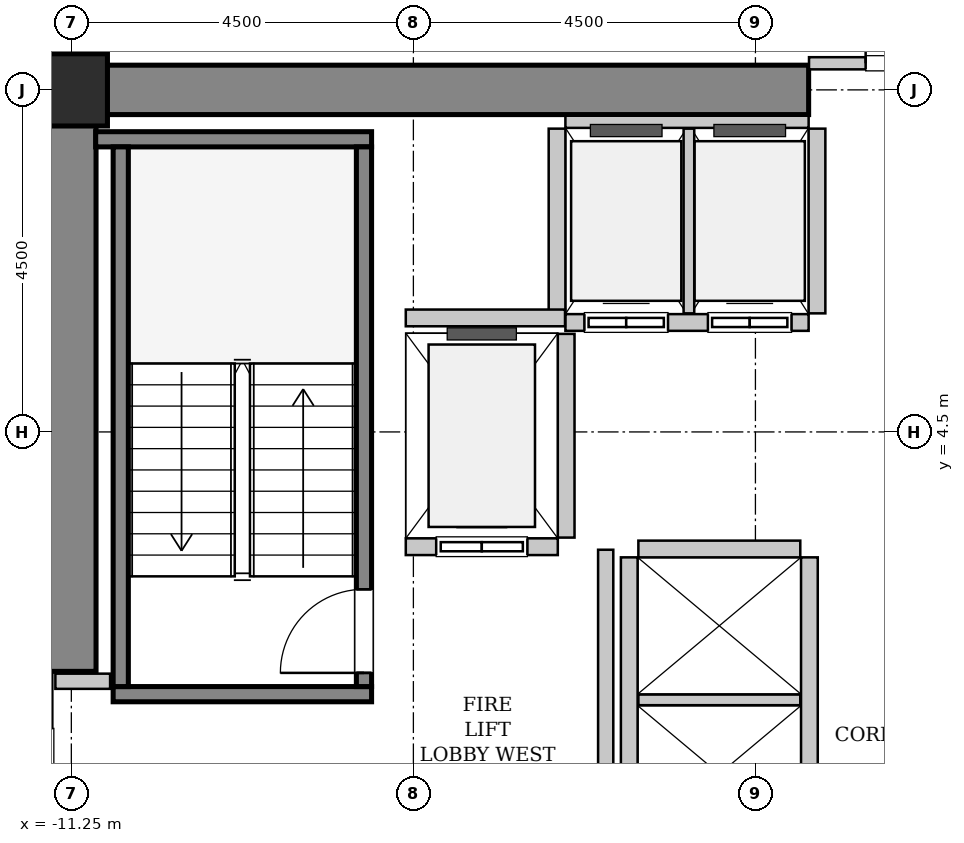
"""IFC4 building model, lengths in metres.
Left out: names, types, materials, properties, quantities, classifications, styles, units other than length and angle.
Written with IfcOpenShell. Run it as: python <this file> out.ifc"""

import sys

from ifc_helpers import new_model, si_unit, direction, frame, frame_2d, origin, origin_2d, place, context, subcontext, project, spatial, rectangle, hollow_rectangle, extrude, source, transform, mapped, element, fill, save


model = new_model("IFC4")
c1 = context("Model", 3, precision=1e-05, world=origin(), true_north=direction((0.0, 1.0)))
c2 = subcontext(c1, "Body", "Model", "MODEL_VIEW")
j1 = project(units=[si_unit("LENGTHUNIT", "METRE"), si_unit("PLANEANGLEUNIT", "RADIAN")], contexts=[c1])
p1 = place(None, origin())
s1 = spatial("IfcSite", under=j1, at=p1, CompositionType="ELEMENT")
p2 = place(p1, origin())
s2 = spatial("IfcBuilding", under=s1, at=p2, CompositionType="ELEMENT")
p3 = place(p2, frame((0.0, 0.0, 44.4)))
s3 = spatial("IfcBuildingStorey", under=s2, at=p3, CompositionType="ELEMENT", Elevation=44.4)
m1 = source(origin(), c2, "Body", "SweptSolid", [
    extrude(rectangle(XDim=10.025, YDim=0.65, at=frame_2d((5.012, 0.0))), origin(), (0.0, 0.0, 1.0), 3.8),
])
p4 = place(p3, frame((-11.575, 9.0, 0.0), z_axis=(0.0, 0.0, 1.0), x_axis=(1.0, 0.0, 0.0)))
e1 = element("IfcWall", 1, at=p4, inside=s3, PredefinedType="SHEAR", context=c2, shape_type="MappedRepresentation", body=[
    mapped(m1, transform((0.0, 0.0, 0.0), x_axis=(1.0, 0.0, 0.0), y_axis=(0.0, 1.0, 0.0), z_axis=(0.0, 0.0, 1.0), scale=1.0)),
])
m2 = source(origin(), c2, "Body", "SweptSolid", [
    extrude(rectangle(XDim=7.325, YDim=0.65, at=frame_2d((3.663, 0.0))), origin(), (0.0, 0.0, 1.0), 3.8),
])
p5 = place(p3, frame((-11.25, 1.35, 0.0), z_axis=(0.0, 0.0, 1.0), x_axis=(0.0, 1.0, 0.0)))
e2 = element("IfcWall", 2, at=p5, inside=s3, PredefinedType="SHEAR", context=c2, shape_type="MappedRepresentation", body=[
    mapped(m2, transform((0.0, 0.0, 0.0), x_axis=(1.0, 0.0, 0.0), y_axis=(0.0, 1.0, 0.0), z_axis=(0.0, 0.0, 1.0), scale=1.0)),
])
m3 = source(origin(), c2, "Body", "SweptSolid", [
    extrude(hollow_rectangle(XDim=0.95, YDim=0.95, WallThickness=0.045, InnerFilletRadius=0.045, OuterFilletRadius=0.09, at=origin_2d()), origin(), (0.0, 0.0, 1.0), 3.8),
])
p6 = place(p3, frame((-11.25, 9.0, 0.0), z_axis=(0.0, 0.0, 1.0), x_axis=(1.0, 0.0, 0.0)))
e3 = element("IfcColumn", 3, at=p6, inside=s3, PredefinedType="COLUMN", context=c2, shape_type="MappedRepresentation", body=[
    mapped(m3, transform((0.0, 0.0, 0.0), x_axis=(1.0, 0.0, 0.0), y_axis=(0.0, 1.0, 0.0), z_axis=(0.0, 0.0, 1.0), scale=1.0)),
])
m4 = source(origin(), c2, "Body", "SweptSolid", [
    extrude(rectangle(XDim=3.4, YDim=0.2, at=frame_2d((1.7, 0.0))), origin(), (0.0, 0.0, 1.0), 3.8),
])
p7 = place(p3, frame((-7.3, 1.05, 0.0), z_axis=(0.0, 0.0, 1.0), x_axis=(-1.0, 0.0, 0.0)))
e4 = element("IfcWall", 4, at=p7, inside=s3, PredefinedType="SOLIDWALL", context=c2, shape_type="MappedRepresentation", body=[
    mapped(m4, transform((0.0, 0.0, 0.0), x_axis=(1.0, 0.0, 0.0), y_axis=(0.0, 1.0, 0.0), z_axis=(0.0, 0.0, 1.0), scale=1.0)),
])
m5 = source(origin(), c2, "Body", "SweptSolid", [
    extrude(rectangle(XDim=3.63, YDim=0.2, at=frame_2d((1.815, 0.0))), origin(), (0.0, 0.0, 1.0), 3.8),
])
p8 = place(p3, frame((-7.3, 8.35, 0.0), z_axis=(0.0, 0.0, 1.0), x_axis=(-1.0, 0.0, 0.0)))
e5 = element("IfcWall", 5, at=p8, inside=s3, PredefinedType="SOLIDWALL", context=c2, shape_type="MappedRepresentation", body=[
    mapped(m5, transform((0.0, 0.0, 0.0), x_axis=(1.0, 0.0, 0.0), y_axis=(0.0, 1.0, 0.0), z_axis=(0.0, 0.0, 1.0), scale=1.0)),
])
m6 = source(origin(), c2, "Body", "SweptSolid", [
    extrude(rectangle(XDim=7.1, YDim=0.2, at=frame_2d((3.55, 0.0))), origin(), (0.0, 0.0, 1.0), 3.8),
])
p9 = place(p3, frame((-7.4, 1.15, 0.0), z_axis=(0.0, 0.0, 1.0), x_axis=(0.0, 1.0, 0.0)))
e6 = element("IfcWall", 6, at=p9, inside=s3, PredefinedType="SOLIDWALL", context=c2, shape_type="MappedRepresentation", body=[
    mapped(m6, transform((0.0, 0.0, 0.0), x_axis=(1.0, 0.0, 0.0), y_axis=(0.0, 1.0, 0.0), z_axis=(0.0, 0.0, 1.0), scale=1.0)),
])
p10 = place(p9, frame((0.18, 0.0, 0.0)))
e7 = element("IfcOpeningElement", 7, at=p10, cuts=e6, PredefinedType="OPENING", context=c2, shape_type="SweptSolid", body=[
    extrude(rectangle(XDim=1.1, YDim=2.15, at=frame_2d((0.55, 1.075))), frame((0.0, 0.11, 0.0), z_axis=(0.0, -1.0, 0.0), x_axis=(1.0, 0.0, 0.0)), (0.0, 0.0, 1.0), 0.22),
])
p11 = place(p3, frame((-10.6, 1.15, 0.0), z_axis=(0.0, 0.0, 1.0), x_axis=(0.0, 1.0, 0.0)))
e8 = element("IfcWall", 8, at=p11, inside=s3, PredefinedType="SOLIDWALL", context=c2, shape_type="MappedRepresentation", body=[
    mapped(m6, transform((0.0, 0.0, 0.0), x_axis=(1.0, 0.0, 0.0), y_axis=(0.0, 1.0, 0.0), z_axis=(0.0, 0.0, 1.0), scale=1.0)),
])
m7 = source(origin(), c2, "Body", "SweptSolid", [
    extrude(rectangle(XDim=2.0, YDim=0.22, at=frame_2d((1.0, 0.0))), origin(), (0.0, 0.0, 1.0), 3.535),
])
p12 = place(p3, frame((-6.85, 2.99, 0.0), z_axis=(0.0, 0.0, 1.0), x_axis=(1.0, 0.0, 0.0)))
e9 = element("IfcWall", 9, at=p12, inside=s3, PredefinedType="SOLIDWALL", context=c2, shape_type="MappedRepresentation", body=[
    mapped(m7, transform((0.0, 0.0, 0.0), x_axis=(1.0, 0.0, 0.0), y_axis=(0.0, 1.0, 0.0), z_axis=(0.0, 0.0, 1.0), scale=1.0)),
])
p13 = place(p12, frame((0.4, 0.0, 0.0)))
e10 = element("IfcOpeningElement", 10, at=p13, cuts=e9, PredefinedType="OPENING", context=c2, shape_type="SweptSolid", body=[
    extrude(rectangle(XDim=1.2, YDim=2.2, at=frame_2d((0.6, 1.1))), frame((0.0, 0.12, 0.0), z_axis=(0.0, -1.0, 0.0), x_axis=(1.0, 0.0, 0.0)), (0.0, 0.0, 1.0), 0.24),
])
m8 = source(origin(), c2, "Body", "SweptSolid", [
    extrude(rectangle(XDim=2.68, YDim=0.22, at=frame_2d((1.34, 0.0))), origin(), (0.0, 0.0, 1.0), 3.535),
])
p14 = place(p3, frame((-4.74, 3.11, 0.0), z_axis=(0.0, 0.0, 1.0), x_axis=(0.0, 1.0, 0.0)))
e11 = element("IfcWall", 11, at=p14, inside=s3, PredefinedType="SOLIDWALL", context=c2, shape_type="MappedRepresentation", body=[
    mapped(m8, transform((0.0, 0.0, 0.0), x_axis=(1.0, 0.0, 0.0), y_axis=(0.0, 1.0, 0.0), z_axis=(0.0, 0.0, 1.0), scale=1.0)),
])
m9 = source(origin(), c2, "Body", "SweptSolid", [
    extrude(rectangle(XDim=3.2, YDim=0.22, at=frame_2d((1.6, 0.0))), origin(), (0.0, 0.0, 1.0), 3.535),
])
p15 = place(p3, frame((-4.75, 5.94, 0.0), z_axis=(0.0, 0.0, 1.0), x_axis=(1.0, 0.0, 0.0)))
e12 = element("IfcWall", 12, at=p15, inside=s3, PredefinedType="SOLIDWALL", context=c2, shape_type="MappedRepresentation", body=[
    mapped(m9, transform((0.0, 0.0, 0.0), x_axis=(1.0, 0.0, 0.0), y_axis=(0.0, 1.0, 0.0), z_axis=(0.0, 0.0, 1.0), scale=1.0)),
])
p16 = place(p15, frame((0.25, 0.0, 0.0)))
e13 = element("IfcOpeningElement", 13, at=p16, cuts=e12, PredefinedType="OPENING", context=c2, shape_type="SweptSolid", body=[
    extrude(rectangle(XDim=1.1, YDim=2.2, at=frame_2d((0.55, 1.1))), frame((0.0, 0.12, 0.0), z_axis=(0.0, -1.0, 0.0), x_axis=(1.0, 0.0, 0.0)), (0.0, 0.0, 1.0), 0.24),
])
p17 = place(p15, frame((1.875, 0.0, 0.0)))
e14 = element("IfcOpeningElement", 14, at=p17, cuts=e12, PredefinedType="OPENING", context=c2, shape_type="SweptSolid", body=[
    extrude(rectangle(XDim=1.1, YDim=2.2, at=frame_2d((0.55, 1.1))), frame((0.0, 0.12, 0.0), z_axis=(0.0, -1.0, 0.0), x_axis=(1.0, 0.0, 0.0)), (0.0, 0.0, 1.0), 0.24),
])
m10 = source(origin(), c2, "Body", "SweptSolid", [
    extrude(rectangle(XDim=3.2, YDim=0.16, at=frame_2d((1.6, 0.0))), origin(), (0.0, 0.0, 1.0), 2.425),
])
p18 = place(p3, frame((-1.55, 8.58, 0.0), z_axis=(0.0, 0.0, 1.0), x_axis=(-1.0, 0.0, 0.0)))
e15 = element("IfcWall", 15, at=p18, inside=s3, PredefinedType="PARTITIONING", context=c2, shape_type="MappedRepresentation", body=[
    mapped(m10, transform((0.0, 0.0, 0.0), x_axis=(1.0, 0.0, 0.0), y_axis=(0.0, 1.0, 0.0), z_axis=(0.0, 0.0, 1.0), scale=1.0)),
])
m11 = source(origin(), c2, "Body", "SweptSolid", [
    extrude(rectangle(XDim=2.43, YDim=0.22, at=frame_2d((1.215, 0.0))), origin(), (0.0, 0.0, 1.0), 3.535),
])
p19 = place(p3, frame((-4.86, 8.49, 0.0), z_axis=(0.0, 0.0, 1.0), x_axis=(0.0, -1.0, 0.0)))
e16 = element("IfcWall", 16, at=p19, inside=s3, PredefinedType="SOLIDWALL", context=c2, shape_type="MappedRepresentation", body=[
    mapped(m11, transform((0.0, 0.0, 0.0), x_axis=(1.0, 0.0, 0.0), y_axis=(0.0, 1.0, 0.0), z_axis=(0.0, 0.0, 1.0), scale=1.0)),
])
m12 = source(origin(), c2, "Body", "SweptSolid", [
    extrude(rectangle(XDim=2.43, YDim=0.14, at=frame_2d((1.215, 0.0))), origin(), (0.0, 0.0, 1.0), 3.535),
])
p20 = place(p3, frame((-3.125, 6.06, 0.0), z_axis=(0.0, 0.0, 1.0), x_axis=(0.0, 1.0, 0.0)))
e17 = element("IfcWall", 17, at=p20, inside=s3, PredefinedType="PARTITIONING", context=c2, shape_type="MappedRepresentation", body=[
    mapped(m12, transform((0.0, 0.0, 0.0), x_axis=(1.0, 0.0, 0.0), y_axis=(0.0, 1.0, 0.0), z_axis=(0.0, 0.0, 1.0), scale=1.0)),
])
p21 = place(p3, frame((-1.44, 6.06, 0.0), z_axis=(0.0, 0.0, 1.0), x_axis=(0.0, 1.0, 0.0)))
e18 = element("IfcWall", 18, at=p21, inside=s3, PredefinedType="SOLIDWALL", context=c2, shape_type="MappedRepresentation", body=[
    mapped(m11, transform((0.0, 0.0, 0.0), x_axis=(1.0, 0.0, 0.0), y_axis=(0.0, 1.0, 0.0), z_axis=(0.0, 0.0, 1.0), scale=1.0)),
])
m13 = source(origin(), c2, "Body", "SweptSolid", [
    extrude(rectangle(XDim=5.7, YDim=0.22, at=frame_2d((2.85, 0.0))), origin(), (0.0, 0.0, 1.0), 3.535),
])
for number, where, z_axis, x_axis in (
    (19, (-1.54, -2.85, 0.0), (0.0, 0.0, 1.0), (0.0, 1.0, 0.0)),
    (20, (-3.91, 2.85, 0.0), (0.0, 0.0, 1.0), (0.0, -1.0, 0.0)),
):
    element("IfcWall", number, at=place(p3, frame(where, z_axis=z_axis, x_axis=x_axis)), inside=s3, PredefinedType="SOLIDWALL", context=c2, shape_type="MappedRepresentation", body=[
        mapped(m13, transform((0.0, 0.0, 0.0), x_axis=(1.0, 0.0, 0.0), y_axis=(0.0, 1.0, 0.0), z_axis=(0.0, 0.0, 1.0), scale=1.0)),
    ])
m14 = source(origin(), c2, "Body", "SweptSolid", [
    extrude(rectangle(XDim=2.13, YDim=0.14, at=frame_2d((1.065, 0.0))), origin(), (0.0, 0.0, 1.0), 3.535),
])
p22 = place(p3, frame((-3.79, 0.975, 0.0), z_axis=(0.0, 0.0, 1.0), x_axis=(1.0, 0.0, 0.0)))
e21 = element("IfcWall", 21, at=p22, inside=s3, PredefinedType="PARTITIONING", context=c2, shape_type="MappedRepresentation", body=[
    mapped(m14, transform((0.0, 0.0, 0.0), x_axis=(1.0, 0.0, 0.0), y_axis=(0.0, 1.0, 0.0), z_axis=(0.0, 0.0, 1.0), scale=1.0)),
])
m15 = source(origin(), c2, "Body", "SweptSolid", [
    extrude(rectangle(XDim=2.13, YDim=0.22, at=frame_2d((1.065, 0.0))), origin(), (0.0, 0.0, 1.0), 3.535),
])
p23 = place(p3, frame((-1.66, 2.96, 0.0), z_axis=(0.0, 0.0, 1.0), x_axis=(-1.0, 0.0, 0.0)))
e22 = element("IfcWall", 22, at=p23, inside=s3, PredefinedType="SOLIDWALL", context=c2, shape_type="MappedRepresentation", body=[
    mapped(m15, transform((0.0, 0.0, 0.0), x_axis=(1.0, 0.0, 0.0), y_axis=(0.0, 1.0, 0.0), z_axis=(0.0, 0.0, 1.0), scale=1.0)),
])
m16 = source(origin(), c2, "Body", "SweptSolid", [
    extrude(rectangle(XDim=2.095, YDim=0.22, at=frame_2d((1.048, 0.0))), origin(), (0.0, 0.0, 1.0), 3.535),
])
p24 = place(p3, frame((-6.85, 6.0, 0.0), z_axis=(0.0, 0.0, 1.0), x_axis=(1.0, 0.0, 0.0)))
e23 = element("IfcWall", 23, at=p24, inside=s3, PredefinedType="SOLIDWALL", context=c2, shape_type="MappedRepresentation", body=[
    mapped(m16, transform((0.0, 0.0, 0.0), x_axis=(1.0, 0.0, 0.0), y_axis=(0.0, 1.0, 0.0), z_axis=(0.0, 0.0, 1.0), scale=1.0)),
])
m17 = source(origin(), c2, "Body", "SweptSolid", [
    extrude(rectangle(XDim=5.9, YDim=0.2, at=frame_2d((2.95, 0.0))), origin(), (0.0, 0.0, 1.0), 3.535),
])
p25 = place(p3, frame((-4.22, -2.95, 0.0), z_axis=(0.0, 0.0, 1.0), x_axis=(0.0, 1.0, 0.0)))
e24 = element("IfcWall", 24, at=p25, inside=s3, PredefinedType="PARTITIONING", context=c2, shape_type="MappedRepresentation", body=[
    mapped(m17, transform((0.0, 0.0, 0.0), x_axis=(1.0, 0.0, 0.0), y_axis=(0.0, 1.0, 0.0), z_axis=(0.0, 0.0, 1.0), scale=1.0)),
])
m18 = source(origin(), c2, "Body", "SweptSolid", [
    extrude(rectangle(XDim=0.72, YDim=0.2, at=frame_2d((0.36, 0.0))), origin(), (0.0, 0.0, 1.0), 3.535),
])
p26 = place(p3, frame((-11.46, 1.22, 0.0), z_axis=(0.0, 0.0, 1.0), x_axis=(1.0, 0.0, 0.0)))
e25 = element("IfcWall", 25, at=p26, inside=s3, PredefinedType="PARTITIONING", context=c2, shape_type="MappedRepresentation", body=[
    mapped(m18, transform((0.0, 0.0, 0.0), x_axis=(1.0, 0.0, 0.0), y_axis=(0.0, 1.0, 0.0), z_axis=(0.0, 0.0, 1.0), scale=1.0)),
])
m19 = source(origin(), c2, "Body", "SweptSolid", [
    extrude(rectangle(XDim=3.09, YDim=0.16, at=frame_2d((1.545, 0.0))), origin(), (0.0, 0.0, 1.0), 2.425),
])
p27 = place(p3, frame((-1.545, 9.35, 0.0), z_axis=(0.0, 0.0, 1.0), x_axis=(1.0, 0.0, 0.0)))
e26 = element("IfcWall", 26, at=p27, inside=s3, PredefinedType="PARTITIONING", context=c2, shape_type="MappedRepresentation", body=[
    mapped(m19, transform((0.0, 0.0, 0.0), x_axis=(1.0, 0.0, 0.0), y_axis=(0.0, 1.0, 0.0), z_axis=(0.0, 0.0, 1.0), scale=1.0)),
])
p28 = place(p27, frame((0.745, 0.0, 0.0)))
e27 = element("IfcOpeningElement", 27, at=p28, cuts=e26, PredefinedType="OPENING", context=c2, shape_type="SweptSolid", body=[
    extrude(rectangle(XDim=1.6, YDim=2.3, at=frame_2d((0.8, 1.15))), frame((0.0, 0.09, 0.0), z_axis=(0.0, -1.0, 0.0), x_axis=(1.0, 0.0, 0.0)), (0.0, 0.0, 1.0), 0.18),
])
m20 = source(origin(), c2, "Body", "SweptSolid", [
    extrude(rectangle(XDim=1.1, YDim=2.15, at=frame_2d((0.55, 1.075))), frame((0.0, 0.025, 0.0), z_axis=(0.0, -1.0, 0.0), x_axis=(1.0, 0.0, 0.0)), (0.0, 0.0, 1.0), 0.05),
])
p29 = place(p10, origin())
e28 = element("IfcDoor", 28, at=p29, inside=s3, OperationType="SINGLE_SWING_LEFT", PredefinedType="DOOR", context=c2, shape_type="MappedRepresentation", body=[
    mapped(m20, transform((0.0, 0.0, 0.0), x_axis=(1.0, 0.0, 0.0), y_axis=(0.0, 1.0, 0.0), z_axis=(0.0, 0.0, 1.0), scale=1.0)),
])
fill(e7, e28)
m21 = source(origin(), c2, "Body", "SweptSolid", [
    extrude(rectangle(XDim=1.2, YDim=2.2, at=frame_2d((0.6, 1.1))), frame((0.0, 0.025, 0.0), z_axis=(0.0, -1.0, 0.0), x_axis=(1.0, 0.0, 0.0)), (0.0, 0.0, 1.0), 0.05),
])
p30 = place(p13, origin())
e29 = element("IfcDoor", 29, at=p30, inside=s3, OperationType="SLIDING_TO_LEFT", PredefinedType="DOOR", context=c2, shape_type="MappedRepresentation", body=[
    mapped(m21, transform((0.0, 0.0, 0.0), x_axis=(1.0, 0.0, 0.0), y_axis=(0.0, 1.0, 0.0), z_axis=(0.0, 0.0, 1.0), scale=1.0)),
])
fill(e10, e29)
m22 = source(origin(), c2, "Body", "SweptSolid", [
    extrude(rectangle(XDim=1.1, YDim=2.2, at=frame_2d((0.55, 1.1))), frame((0.0, 0.025, 0.0), z_axis=(0.0, -1.0, 0.0), x_axis=(1.0, 0.0, 0.0)), (0.0, 0.0, 1.0), 0.05),
])
p31 = place(p16, origin())
e30 = element("IfcDoor", 30, at=p31, inside=s3, OperationType="DOUBLE_DOOR_SLIDING", PredefinedType="DOOR", context=c2, shape_type="MappedRepresentation", body=[
    mapped(m22, transform((0.0, 0.0, 0.0), x_axis=(1.0, 0.0, 0.0), y_axis=(0.0, 1.0, 0.0), z_axis=(0.0, 0.0, 1.0), scale=1.0)),
])
fill(e13, e30)
p32 = place(p17, origin())
e31 = element("IfcDoor", 31, at=p32, inside=s3, OperationType="DOUBLE_DOOR_SLIDING", PredefinedType="DOOR", context=c2, shape_type="MappedRepresentation", body=[
    mapped(m22, transform((0.0, 0.0, 0.0), x_axis=(1.0, 0.0, 0.0), y_axis=(0.0, 1.0, 0.0), z_axis=(0.0, 0.0, 1.0), scale=1.0)),
])
fill(e14, e31)
m23 = source(origin(), c2, "Body", "SweptSolid", [
    extrude(rectangle(XDim=1.6, YDim=2.3, at=frame_2d((0.8, 1.15))), frame((0.0, 0.025, 0.0), z_axis=(0.0, -1.0, 0.0), x_axis=(1.0, 0.0, 0.0)), (0.0, 0.0, 1.0), 0.05),
])
p33 = place(p28, origin())
e32 = element("IfcDoor", 32, at=p33, inside=s3, OperationType="DOUBLE_DOOR_SINGLE_SWING", PredefinedType="DOOR", context=c2, shape_type="MappedRepresentation", body=[
    mapped(m23, transform((0.0, 0.0, 0.0), x_axis=(1.0, 0.0, 0.0), y_axis=(0.0, 1.0, 0.0), z_axis=(0.0, 0.0, 1.0), scale=1.0)),
])
fill(e27, e32)
save(model, sys.argv[1])
